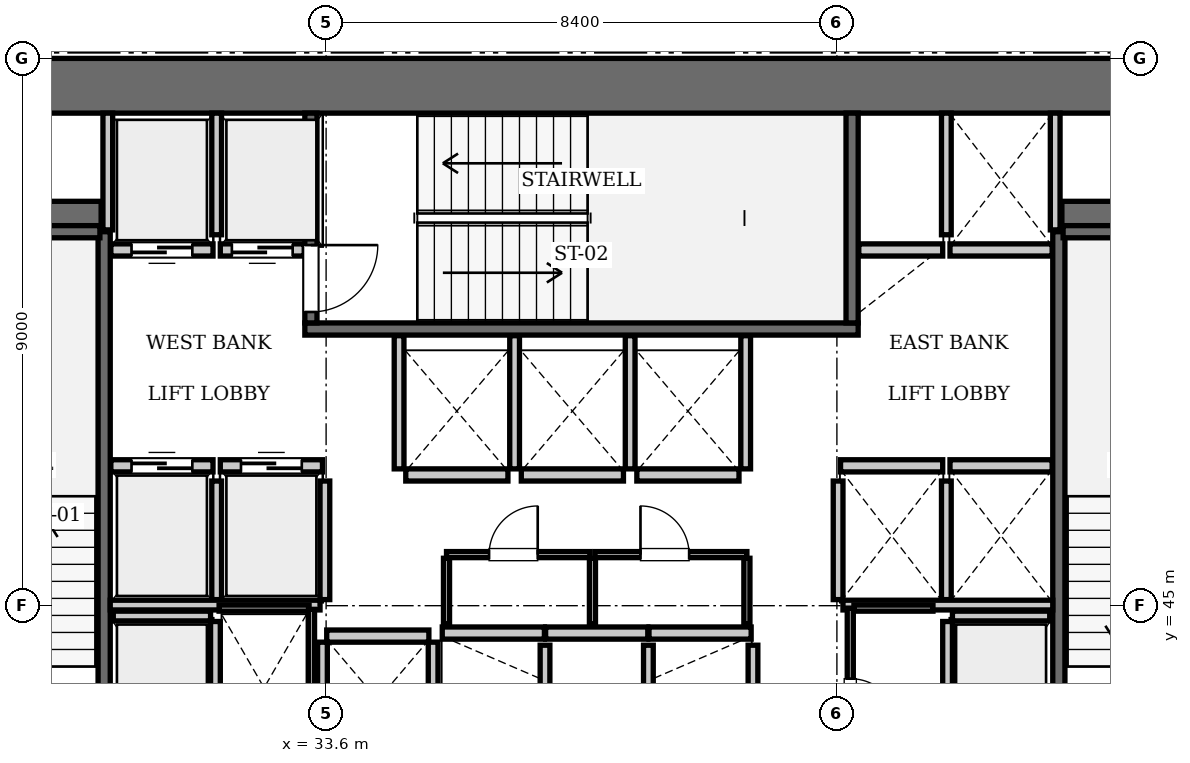
"""IFC4 building model, lengths in metres.
Left out: names, types, materials, properties, quantities, classifications, styles, units other than length and angle.
Written with IfcOpenShell. Run it as: python <this file> out.ifc"""

import sys

from ifc_helpers import new_model, si_unit, direction, frame, frame_2d, origin, place, context, subcontext, project, spatial, rectangle, extrude, element, fill, save


model = new_model("IFC4")
c1 = context("Model", 3, precision=1e-05, world=origin(), true_north=direction((0.0, 1.0)))
c2 = subcontext(c1, "Body", "Model", "MODEL_VIEW")
j1 = project(units=[si_unit("LENGTHUNIT", "METRE"), si_unit("PLANEANGLEUNIT", "RADIAN")], contexts=[c1])
p1 = place(None, origin())
s1 = spatial("IfcSite", under=j1, at=p1, CompositionType="ELEMENT")
p2 = place(p1, origin())
s2 = spatial("IfcBuilding", under=s1, at=p2, CompositionType="ELEMENT")
p3 = place(p2, frame((0.0, 0.0, 96.25)))
s3 = spatial("IfcBuildingStorey", under=s2, at=p3, CompositionType="ELEMENT", Elevation=96.25)
p4 = place(p3, frame((25.2, 53.55, 0.0), z_axis=(0.0, 0.0, 1.0), x_axis=(1.0, 0.0, 0.0)))
e1 = element("IfcWall", 1, at=p4, inside=s3, PredefinedType="SHEAR", context=c2, shape_type="SweptSolid", body=[
    extrude(rectangle(XDim=25.2, YDim=0.9, at=frame_2d((12.6, 0.0))), origin(), (0.0, 0.0, 1.0), 3.85),
])
p5 = place(p3, frame((26.1, 51.4, 0.0), z_axis=(0.0, 0.0, 1.0), x_axis=(1.0, 0.0, 0.0)))
e2 = element("IfcWall", 2, at=p5, inside=s3, PredefinedType="SHEAR", context=c2, shape_type="SweptSolid", body=[
    extrude(rectangle(XDim=3.8, YDim=0.5, at=frame_2d((1.9, 0.0))), origin(), (0.0, 0.0, 1.0), 3.85),
])
p6 = place(p3, frame((45.7, 51.4, 0.0), z_axis=(0.0, 0.0, 1.0), x_axis=(1.0, 0.0, 0.0)))
e3 = element("IfcWall", 3, at=p6, inside=s3, PredefinedType="SHEAR", context=c2, shape_type="SweptSolid", body=[
    extrude(rectangle(XDim=3.8, YDim=0.5, at=frame_2d((1.9, 0.0))), origin(), (0.0, 0.0, 1.0), 3.85),
])
p7 = place(p3, frame((29.95, 42.3, 0.0), z_axis=(0.0, 0.0, 1.0), x_axis=(0.0, 1.0, 0.0)))
e4 = element("IfcWall", 4, at=p7, inside=s3, PredefinedType="SOLIDWALL", context=c2, shape_type="SweptSolid", body=[
    extrude(rectangle(XDim=8.85, YDim=0.2, at=frame_2d((4.425, 0.0))), origin(), (0.0, 0.0, 1.0), 3.61),
])
p8 = place(p3, frame((26.38, 51.15, 0.0), z_axis=(0.0, 0.0, 1.0), x_axis=(1.0, 0.0, 0.0)))
e5 = element("IfcWall", 5, at=p8, inside=s3, PredefinedType="SOLIDWALL", context=c2, shape_type="SweptSolid", body=[
    extrude(rectangle(XDim=3.5, YDim=0.2, at=frame_2d((1.75, 0.0))), origin(), (0.0, 0.0, 1.0), 3.61),
])
p9 = place(p3, frame((33.25, 49.55, 0.0), z_axis=(0.0, 0.0, 1.0), x_axis=(1.0, 0.0, 0.0)))
e6 = element("IfcWall", 6, at=p9, inside=s3, PredefinedType="SOLIDWALL", context=c2, shape_type="SweptSolid", body=[
    extrude(rectangle(XDim=9.1, YDim=0.2, at=frame_2d((4.55, 0.0))), origin(), (0.0, 0.0, 1.0), 3.61),
])
p10 = place(p3, frame((42.25, 49.65, 0.0), z_axis=(0.0, 0.0, 1.0), x_axis=(0.0, 1.0, 0.0)))
e7 = element("IfcWall", 7, at=p10, inside=s3, PredefinedType="SOLIDWALL", context=c2, shape_type="SweptSolid", body=[
    extrude(rectangle(XDim=3.45, YDim=0.2, at=frame_2d((1.725, 0.0))), origin(), (0.0, 0.0, 1.0), 3.61),
])
p11 = place(p3, frame((33.35, 49.65, 0.0), z_axis=(0.0, 0.0, 1.0), x_axis=(0.0, 1.0, 0.0)))
e8 = element("IfcWall", 8, at=p11, inside=s3, PredefinedType="SOLIDWALL", context=c2, shape_type="SweptSolid", body=[
    extrude(rectangle(XDim=3.45, YDim=0.2, at=frame_2d((1.725, 0.0))), origin(), (0.0, 0.0, 1.0), 3.61),
])
p12 = place(p11, frame((0.18, 0.0, 0.0)))
e9 = element("IfcOpeningElement", 9, at=p12, cuts=e8, PredefinedType="OPENING", context=c2, shape_type="SweptSolid", body=[
    extrude(rectangle(XDim=1.1, YDim=2.15, at=frame_2d((0.55, 1.075))), frame((0.0, 0.11, 0.0), z_axis=(0.0, -1.0, 0.0), x_axis=(1.0, 0.0, 0.0)), (0.0, 0.0, 1.0), 0.22),
])
p13 = place(p3, frame((45.65, 42.3, 0.0), z_axis=(0.0, 0.0, 1.0), x_axis=(0.0, 1.0, 0.0)))
e10 = element("IfcWall", 10, at=p13, inside=s3, PredefinedType="SOLIDWALL", context=c2, shape_type="SweptSolid", body=[
    extrude(rectangle(XDim=8.85, YDim=0.2, at=frame_2d((4.425, 0.0))), origin(), (0.0, 0.0, 1.0), 3.61),
])
p14 = place(p3, frame((45.72, 51.15, 0.0), z_axis=(0.0, 0.0, 1.0), x_axis=(1.0, 0.0, 0.0)))
e11 = element("IfcWall", 11, at=p14, inside=s3, PredefinedType="SOLIDWALL", context=c2, shape_type="SweptSolid", body=[
    extrude(rectangle(XDim=3.5, YDim=0.2, at=frame_2d((1.75, 0.0))), origin(), (0.0, 0.0, 1.0), 3.61),
])
p15 = place(p3, frame((30.06, 47.3, 0.0), z_axis=(0.0, 0.0, 1.0), x_axis=(1.0, 0.0, 0.0)))
e12 = element("IfcWall", 12, at=p15, inside=s3, PredefinedType="SOLIDWALL", context=c2, shape_type="SweptSolid", body=[
    extrude(rectangle(XDim=1.68, YDim=0.2, at=frame_2d((0.84, 0.0))), origin(), (0.0, 0.0, 1.0), 3.61),
])
p16 = place(p15, frame((0.34, 0.0, 0.0)))
e13 = element("IfcOpeningElement", 13, at=p16, cuts=e12, PredefinedType="OPENING", context=c2, shape_type="SweptSolid", body=[
    extrude(rectangle(XDim=1.0, YDim=2.15, at=frame_2d((0.5, 1.075))), frame((0.0, 0.11, 0.0), z_axis=(0.0, -1.0, 0.0), x_axis=(1.0, 0.0, 0.0)), (0.0, 0.0, 1.0), 0.22),
])
p17 = place(p3, frame((31.86, 47.3, 0.0), z_axis=(0.0, 0.0, 1.0), x_axis=(1.0, 0.0, 0.0)))
e14 = element("IfcWall", 14, at=p17, inside=s3, PredefinedType="SOLIDWALL", context=c2, shape_type="SweptSolid", body=[
    extrude(rectangle(XDim=1.68, YDim=0.2, at=frame_2d((0.84, 0.0))), origin(), (0.0, 0.0, 1.0), 3.61),
])
p18 = place(p17, frame((0.34, 0.0, 0.0)))
e15 = element("IfcOpeningElement", 15, at=p18, cuts=e14, PredefinedType="OPENING", context=c2, shape_type="SweptSolid", body=[
    extrude(rectangle(XDim=1.0, YDim=2.15, at=frame_2d((0.5, 1.075))), frame((0.0, 0.11, 0.0), z_axis=(0.0, -1.0, 0.0), x_axis=(1.0, 0.0, 0.0)), (0.0, 0.0, 1.0), 0.22),
])
p19 = place(p3, frame((30.06, 50.85, 0.0), z_axis=(0.0, 0.0, 1.0), x_axis=(1.0, 0.0, 0.0)))
e16 = element("IfcWall", 16, at=p19, inside=s3, PredefinedType="SOLIDWALL", context=c2, shape_type="SweptSolid", body=[
    extrude(rectangle(XDim=1.68, YDim=0.2, at=frame_2d((0.84, 0.0))), origin(), (0.0, 0.0, 1.0), 3.61),
])
p20 = place(p19, frame((0.34, 0.0, 0.0)))
e17 = element("IfcOpeningElement", 17, at=p20, cuts=e16, PredefinedType="OPENING", context=c2, shape_type="SweptSolid", body=[
    extrude(rectangle(XDim=1.0, YDim=2.15, at=frame_2d((0.5, 1.075))), frame((0.0, 0.11, 0.0), z_axis=(0.0, -1.0, 0.0), x_axis=(1.0, 0.0, 0.0)), (0.0, 0.0, 1.0), 0.22),
])
p21 = place(p3, frame((31.86, 50.85, 0.0), z_axis=(0.0, 0.0, 1.0), x_axis=(1.0, 0.0, 0.0)))
e18 = element("IfcWall", 18, at=p21, inside=s3, PredefinedType="SOLIDWALL", context=c2, shape_type="SweptSolid", body=[
    extrude(rectangle(XDim=1.38, YDim=0.2, at=frame_2d((0.69, 0.0))), origin(), (0.0, 0.0, 1.0), 3.61),
])
p22 = place(p21, frame((0.19, 0.0, 0.0)))
e19 = element("IfcOpeningElement", 19, at=p22, cuts=e18, PredefinedType="OPENING", context=c2, shape_type="SweptSolid", body=[
    extrude(rectangle(XDim=1.0, YDim=2.15, at=frame_2d((0.5, 1.075))), frame((0.0, 0.11, 0.0), z_axis=(0.0, -1.0, 0.0), x_axis=(1.0, 0.0, 0.0)), (0.0, 0.0, 1.0), 0.22),
])
for number, where, z_axis, x_axis in (
    (20, (42.06, 47.3, 0.0), (0.0, 0.0, 1.0), (1.0, 0.0, 0.0)),
    (21, (43.86, 47.3, 0.0), (0.0, 0.0, 1.0), (1.0, 0.0, 0.0)),
):
    element("IfcWall", number, at=place(p3, frame(where, z_axis=z_axis, x_axis=x_axis)), inside=s3, PredefinedType="SOLIDWALL", context=c2, shape_type="SweptSolid", body=[
        extrude(rectangle(XDim=1.68, YDim=0.2, at=frame_2d((0.84, 0.0))), origin(), (0.0, 0.0, 1.0), 3.61),
    ])
p23 = place(p3, frame((42.36, 50.85, 0.0), z_axis=(0.0, 0.0, 1.0), x_axis=(1.0, 0.0, 0.0)))
e22 = element("IfcWall", 22, at=p23, inside=s3, PredefinedType="SOLIDWALL", context=c2, shape_type="SweptSolid", body=[
    extrude(rectangle(XDim=1.38, YDim=0.2, at=frame_2d((0.69, 0.0))), origin(), (0.0, 0.0, 1.0), 3.61),
])
for number, where, z_axis, x_axis in (
    (23, (43.86, 50.85, 0.0), (0.0, 0.0, 1.0), (1.0, 0.0, 0.0)),
    (24, (35.51, 44.55, 0.0), (0.0, 0.0, 1.0), (1.0, 0.0, 0.0)),
    (25, (37.21, 44.55, 0.0), (0.0, 0.0, 1.0), (1.0, 0.0, 0.0)),
):
    element("IfcWall", number, at=place(p3, frame(where, z_axis=z_axis, x_axis=x_axis)), inside=s3, PredefinedType="SOLIDWALL", context=c2, shape_type="SweptSolid", body=[
        extrude(rectangle(XDim=1.68, YDim=0.2, at=frame_2d((0.84, 0.0))), origin(), (0.0, 0.0, 1.0), 3.61),
    ])
for number, where, z_axis, x_axis in (
    (26, (38.91, 44.55, 0.0), (0.0, 0.0, 1.0), (1.0, 0.0, 0.0)),
    (27, (34.91, 47.15, 0.0), (0.0, 0.0, 1.0), (1.0, 0.0, 0.0)),
):
    element("IfcWall", number, at=place(p3, frame(where, z_axis=z_axis, x_axis=x_axis)), inside=s3, PredefinedType="SOLIDWALL", context=c2, shape_type="SweptSolid", body=[
        extrude(rectangle(XDim=1.68, YDim=0.2, at=frame_2d((0.84, 0.0))), origin(), (0.0, 0.0, 1.0), 3.61),
    ])
for number, where, z_axis, x_axis in (
    (28, (36.81, 47.15, 0.0), (0.0, 0.0, 1.0), (1.0, 0.0, 0.0)),
    (29, (38.71, 47.15, 0.0), (0.0, 0.0, 1.0), (1.0, 0.0, 0.0)),
    (30, (33.61, 44.5, 0.0), (0.0, 0.0, 1.0), (1.0, 0.0, 0.0)),
):
    element("IfcWall", number, at=place(p3, frame(where, z_axis=z_axis, x_axis=x_axis)), inside=s3, PredefinedType="SOLIDWALL", context=c2, shape_type="SweptSolid", body=[
        extrude(rectangle(XDim=1.68, YDim=0.2, at=frame_2d((0.84, 0.0))), origin(), (0.0, 0.0, 1.0), 3.61),
    ])
p24 = place(p3, frame((30.1, 44.83, 0.0), z_axis=(0.0, 0.0, 1.0), x_axis=(1.0, 0.0, 0.0)))
e31 = element("IfcWall", 31, at=p24, inside=s3, PredefinedType="SOLIDWALL", context=c2, shape_type="SweptSolid", body=[
    extrude(rectangle(XDim=1.6, YDim=0.16, at=frame_2d((0.8, 0.0))), origin(), (0.0, 0.0, 1.0), 3.61),
])
p25 = place(p3, frame((31.78, 42.3, 0.0), z_axis=(0.0, 0.0, 1.0), x_axis=(0.0, 1.0, 0.0)))
e32 = element("IfcWall", 32, at=p25, inside=s3, PredefinedType="SOLIDWALL", context=c2, shape_type="SweptSolid", body=[
    extrude(rectangle(XDim=2.44, YDim=0.16, at=frame_2d((1.22, 0.0))), origin(), (0.0, 0.0, 1.0), 3.61),
])
p26 = place(p3, frame((43.9, 44.83, 0.0), z_axis=(0.0, 0.0, 1.0), x_axis=(1.0, 0.0, 0.0)))
e33 = element("IfcWall", 33, at=p26, inside=s3, PredefinedType="SOLIDWALL", context=c2, shape_type="SweptSolid", body=[
    extrude(rectangle(XDim=1.6, YDim=0.16, at=frame_2d((0.8, 0.0))), origin(), (0.0, 0.0, 1.0), 3.61),
])
p27 = place(p3, frame((43.82, 42.3, 0.0), z_axis=(0.0, 0.0, 1.0), x_axis=(0.0, 1.0, 0.0)))
e34 = element("IfcWall", 34, at=p27, inside=s3, PredefinedType="SOLIDWALL", context=c2, shape_type="SweptSolid", body=[
    extrude(rectangle(XDim=2.44, YDim=0.16, at=frame_2d((1.22, 0.0))), origin(), (0.0, 0.0, 1.0), 3.61),
])
for number, where, z_axis, x_axis in (
    (35, (31.8, 45.1, 0.0), (0.0, 0.0, 1.0), (0.0, 1.0, 0.0)),
    (36, (33.58, 45.1, 0.0), (0.0, 0.0, 1.0), (0.0, 1.0, 0.0)),
):
    element("IfcWall", number, at=place(p3, frame(where, z_axis=z_axis, x_axis=x_axis)), inside=s3, PredefinedType="SOLIDWALL", context=c2, shape_type="SweptSolid", body=[
        extrude(rectangle(XDim=1.95, YDim=0.16, at=frame_2d((0.975, 0.0))), origin(), (0.0, 0.0, 1.0), 3.61),
    ])
p28 = place(p3, frame((30.05, 45.01, 0.0), z_axis=(0.0, 0.0, 1.0), x_axis=(1.0, 0.0, 0.0)))
e37 = element("IfcWall", 37, at=p28, inside=s3, PredefinedType="SOLIDWALL", context=c2, shape_type="SweptSolid", body=[
    extrude(rectangle(XDim=3.45, YDim=0.16, at=frame_2d((1.725, 0.0))), origin(), (0.0, 0.0, 1.0), 3.61),
])
p29 = place(p3, frame((30.01, 51.18, 0.0), z_axis=(0.0, 0.0, 1.0), x_axis=(0.0, 1.0, 0.0)))
e38 = element("IfcWall", 38, at=p29, inside=s3, PredefinedType="SOLIDWALL", context=c2, shape_type="SweptSolid", body=[
    extrude(rectangle(XDim=1.92, YDim=0.16, at=frame_2d((0.96, 0.0))), origin(), (0.0, 0.0, 1.0), 3.61),
])
p30 = place(p3, frame((31.8, 51.1, 0.0), z_axis=(0.0, 0.0, 1.0), x_axis=(0.0, 1.0, 0.0)))
e39 = element("IfcWall", 39, at=p30, inside=s3, PredefinedType="SOLIDWALL", context=c2, shape_type="SweptSolid", body=[
    extrude(rectangle(XDim=2.0, YDim=0.16, at=frame_2d((1.0, 0.0))), origin(), (0.0, 0.0, 1.0), 3.61),
])
for number, where, z_axis, x_axis in (
    (40, (42.02, 45.1, 0.0), (0.0, 0.0, 1.0), (0.0, 1.0, 0.0)),
    (41, (43.8, 45.1, 0.0), (0.0, 0.0, 1.0), (0.0, 1.0, 0.0)),
):
    element("IfcWall", number, at=place(p3, frame(where, z_axis=z_axis, x_axis=x_axis)), inside=s3, PredefinedType="SOLIDWALL", context=c2, shape_type="SweptSolid", body=[
        extrude(rectangle(XDim=1.95, YDim=0.16, at=frame_2d((0.975, 0.0))), origin(), (0.0, 0.0, 1.0), 3.61),
    ])
p31 = place(p3, frame((42.1, 45.01, 0.0), z_axis=(0.0, 0.0, 1.0), x_axis=(1.0, 0.0, 0.0)))
e42 = element("IfcWall", 42, at=p31, inside=s3, PredefinedType="SOLIDWALL", context=c2, shape_type="SweptSolid", body=[
    extrude(rectangle(XDim=3.45, YDim=0.16, at=frame_2d((1.725, 0.0))), origin(), (0.0, 0.0, 1.0), 3.61),
])
p32 = place(p3, frame((45.59, 51.18, 0.0), z_axis=(0.0, 0.0, 1.0), x_axis=(0.0, 1.0, 0.0)))
e43 = element("IfcWall", 43, at=p32, inside=s3, PredefinedType="SOLIDWALL", context=c2, shape_type="SweptSolid", body=[
    extrude(rectangle(XDim=1.92, YDim=0.16, at=frame_2d((0.96, 0.0))), origin(), (0.0, 0.0, 1.0), 3.61),
])
p33 = place(p3, frame((43.8, 51.1, 0.0), z_axis=(0.0, 0.0, 1.0), x_axis=(0.0, 1.0, 0.0)))
e44 = element("IfcWall", 44, at=p33, inside=s3, PredefinedType="SOLIDWALL", context=c2, shape_type="SweptSolid", body=[
    extrude(rectangle(XDim=2.0, YDim=0.16, at=frame_2d((1.0, 0.0))), origin(), (0.0, 0.0, 1.0), 3.61),
])
for number, where, z_axis, x_axis in (
    (45, (37.2, 42.3, 0.0), (0.0, 0.0, 1.0), (0.0, 1.0, 0.0)),
    (46, (38.9, 42.3, 0.0), (0.0, 0.0, 1.0), (0.0, 1.0, 0.0)),
    (47, (40.62, 42.3, 0.0), (0.0, 0.0, 1.0), (0.0, 1.0, 0.0)),
):
    element("IfcWall", number, at=place(p3, frame(where, z_axis=z_axis, x_axis=x_axis)), inside=s3, PredefinedType="SOLIDWALL", context=c2, shape_type="SweptSolid", body=[
        extrude(rectangle(XDim=2.05, YDim=0.16, at=frame_2d((1.025, 0.0))), origin(), (0.0, 0.0, 1.0), 3.61),
    ])
for number, where, z_axis, x_axis in (
    (48, (34.8, 47.25, 0.0), (0.0, 0.0, 1.0), (0.0, 1.0, 0.0)),
    (49, (36.7, 47.25, 0.0), (0.0, 0.0, 1.0), (0.0, 1.0, 0.0)),
    (50, (38.6, 47.25, 0.0), (0.0, 0.0, 1.0), (0.0, 1.0, 0.0)),
    (51, (40.5, 47.25, 0.0), (0.0, 0.0, 1.0), (0.0, 1.0, 0.0)),
):
    element("IfcWall", number, at=place(p3, frame(where, z_axis=z_axis, x_axis=x_axis)), inside=s3, PredefinedType="SOLIDWALL", context=c2, shape_type="SweptSolid", body=[
        extrude(rectangle(XDim=2.19, YDim=0.16, at=frame_2d((1.095, 0.0))), origin(), (0.0, 0.0, 1.0), 3.61),
    ])
for number, where, z_axis, x_axis in (
    (52, (33.54, 42.3, 0.0), (0.0, 0.0, 1.0), (0.0, 1.0, 0.0)),
    (53, (35.36, 42.3, 0.0), (0.0, 0.0, 1.0), (0.0, 1.0, 0.0)),
):
    element("IfcWall", number, at=place(p3, frame(where, z_axis=z_axis, x_axis=x_axis)), inside=s3, PredefinedType="SOLIDWALL", context=c2, shape_type="SweptSolid", body=[
        extrude(rectangle(XDim=2.1, YDim=0.16, at=frame_2d((1.05, 0.0))), origin(), (0.0, 0.0, 1.0), 3.61),
    ])
p34 = place(p3, frame((31.84, 44.96, 0.0), z_axis=(0.0, 0.0, 1.0), x_axis=(1.0, 0.0, 0.0)))
e54 = element("IfcWall", 54, at=p34, inside=s3, PredefinedType="PARTITIONING", context=c2, shape_type="SweptSolid", body=[
    extrude(rectangle(XDim=1.48, YDim=0.1, at=frame_2d((0.74, 0.0))), origin(), (0.0, 0.0, 1.0), 3.61),
])
p35 = place(p3, frame((33.36, 42.36, 0.0), z_axis=(0.0, 0.0, 1.0), x_axis=(0.0, 1.0, 0.0)))
e55 = element("IfcWall", 55, at=p35, inside=s3, PredefinedType="PARTITIONING", context=c2, shape_type="SweptSolid", body=[
    extrude(rectangle(XDim=2.58, YDim=0.1, at=frame_2d((1.29, 0.0))), origin(), (0.0, 0.0, 1.0), 3.61),
])
p36 = place(p3, frame((35.58, 45.84, 0.0), z_axis=(0.0, 0.0, 1.0), x_axis=(1.0, 0.0, 0.0)))
e56 = element("IfcWall", 56, at=p36, inside=s3, PredefinedType="PARTITIONING", context=c2, shape_type="SweptSolid", body=[
    extrude(rectangle(XDim=2.36, YDim=0.1, at=frame_2d((1.18, 0.0))), origin(), (0.0, 0.0, 1.0), 3.61),
])
p37 = place(p36, frame((0.7, 0.0, 0.0)))
e57 = element("IfcOpeningElement", 57, at=p37, cuts=e56, PredefinedType="OPENING", context=c2, shape_type="SweptSolid", body=[
    extrude(rectangle(XDim=0.8, YDim=2.05, at=frame_2d((0.4, 1.025))), frame((0.0, 0.06, 0.0), z_axis=(0.0, -1.0, 0.0), x_axis=(1.0, 0.0, 0.0)), (0.0, 0.0, 1.0), 0.12),
])
p38 = place(p3, frame((38.02, 45.84, 0.0), z_axis=(0.0, 0.0, 1.0), x_axis=(1.0, 0.0, 0.0)))
e58 = element("IfcWall", 58, at=p38, inside=s3, PredefinedType="PARTITIONING", context=c2, shape_type="SweptSolid", body=[
    extrude(rectangle(XDim=2.5, YDim=0.1, at=frame_2d((1.25, 0.0))), origin(), (0.0, 0.0, 1.0), 3.61),
])
p39 = place(p38, frame((0.75, 0.0, 0.0)))
e59 = element("IfcOpeningElement", 59, at=p39, cuts=e58, PredefinedType="OPENING", context=c2, shape_type="SweptSolid", body=[
    extrude(rectangle(XDim=0.8, YDim=2.05, at=frame_2d((0.4, 1.025))), frame((0.0, 0.06, 0.0), z_axis=(0.0, -1.0, 0.0), x_axis=(1.0, 0.0, 0.0)), (0.0, 0.0, 1.0), 0.12),
])
for number, where, z_axis, x_axis in (
    (60, (35.58, 44.7, 0.0), (0.0, 0.0, 1.0), (0.0, 1.0, 0.0)),
    (61, (37.98, 44.7, 0.0), (0.0, 0.0, 1.0), (0.0, 1.0, 0.0)),
    (62, (40.52, 44.7, 0.0), (0.0, 0.0, 1.0), (0.0, 1.0, 0.0)),
):
    element("IfcWall", number, at=place(p3, frame(where, z_axis=z_axis, x_axis=x_axis)), inside=s3, PredefinedType="PARTITIONING", context=c2, shape_type="SweptSolid", body=[
        extrude(rectangle(XDim=1.08, YDim=0.1, at=frame_2d((0.54, 0.0))), origin(), (0.0, 0.0, 1.0), 3.61),
    ])
p40 = place(p3, frame((42.22, 42.35, 0.0), z_axis=(0.0, 0.0, 1.0), x_axis=(0.0, 1.0, 0.0)))
e63 = element("IfcWall", 63, at=p40, inside=s3, PredefinedType="PARTITIONING", context=c2, shape_type="SweptSolid", body=[
    extrude(rectangle(XDim=2.61, YDim=0.1, at=frame_2d((1.305, 0.0))), origin(), (0.0, 0.0, 1.0), 3.61),
])
p41 = place(p40, frame((0.65, 0.0, 0.0)))
e64 = element("IfcOpeningElement", 64, at=p41, cuts=e63, PredefinedType="OPENING", context=c2, shape_type="SweptSolid", body=[
    extrude(rectangle(XDim=0.8, YDim=2.05, at=frame_2d((0.4, 1.025))), frame((0.0, 0.06, 0.0), z_axis=(0.0, -1.0, 0.0), x_axis=(1.0, 0.0, 0.0)), (0.0, 0.0, 1.0), 0.12),
])
p42 = place(p3, frame((42.28, 44.96, 0.0), z_axis=(0.0, 0.0, 1.0), x_axis=(1.0, 0.0, 0.0)))
e65 = element("IfcWall", 65, at=p42, inside=s3, PredefinedType="PARTITIONING", context=c2, shape_type="SweptSolid", body=[
    extrude(rectangle(XDim=1.3, YDim=0.1, at=frame_2d((0.65, 0.0))), origin(), (0.0, 0.0, 1.0), 3.61),
])
p43 = place(p12, frame((1.1, 0.0, 0.0), z_axis=(0.0, 0.0, 1.0), x_axis=(-1.0, 0.0, 0.0)))
e66 = element("IfcDoor", 66, at=p43, inside=s3, OperationType="SINGLE_SWING_LEFT", PredefinedType="DOOR", context=c2, shape_type="SweptSolid", body=[
    extrude(rectangle(XDim=1.1, YDim=2.15, at=frame_2d((0.55, 1.075))), frame((0.0, 0.025, 0.0), z_axis=(0.0, -1.0, 0.0), x_axis=(1.0, 0.0, 0.0)), (0.0, 0.0, 1.0), 0.05),
])
fill(e9, e66)
p44 = place(p16, origin())
e67 = element("IfcDoor", 67, at=p44, inside=s3, OperationType="SLIDING_TO_LEFT", PredefinedType="DOOR", context=c2, shape_type="SweptSolid", body=[
    extrude(rectangle(XDim=1.0, YDim=2.15, at=frame_2d((0.5, 1.075))), frame((0.0, 0.025, 0.0), z_axis=(0.0, -1.0, 0.0), x_axis=(1.0, 0.0, 0.0)), (0.0, 0.0, 1.0), 0.05),
])
fill(e13, e67)
p45 = place(p18, origin())
e68 = element("IfcDoor", 68, at=p45, inside=s3, OperationType="SLIDING_TO_LEFT", PredefinedType="DOOR", context=c2, shape_type="SweptSolid", body=[
    extrude(rectangle(XDim=1.0, YDim=2.15, at=frame_2d((0.5, 1.075))), frame((0.0, 0.025, 0.0), z_axis=(0.0, -1.0, 0.0), x_axis=(1.0, 0.0, 0.0)), (0.0, 0.0, 1.0), 0.05),
])
fill(e15, e68)
p46 = place(p20, frame((1.0, 0.0, 0.0), z_axis=(0.0, 0.0, 1.0), x_axis=(-1.0, 0.0, 0.0)))
e69 = element("IfcDoor", 69, at=p46, inside=s3, OperationType="SLIDING_TO_LEFT", PredefinedType="DOOR", context=c2, shape_type="SweptSolid", body=[
    extrude(rectangle(XDim=1.0, YDim=2.15, at=frame_2d((0.5, 1.075))), frame((0.0, 0.025, 0.0), z_axis=(0.0, -1.0, 0.0), x_axis=(1.0, 0.0, 0.0)), (0.0, 0.0, 1.0), 0.05),
])
fill(e17, e69)
p47 = place(p22, frame((1.0, 0.0, 0.0), z_axis=(0.0, 0.0, 1.0), x_axis=(-1.0, 0.0, 0.0)))
e70 = element("IfcDoor", 70, at=p47, inside=s3, OperationType="SLIDING_TO_LEFT", PredefinedType="DOOR", context=c2, shape_type="SweptSolid", body=[
    extrude(rectangle(XDim=1.0, YDim=2.15, at=frame_2d((0.5, 1.075))), frame((0.0, 0.025, 0.0), z_axis=(0.0, -1.0, 0.0), x_axis=(1.0, 0.0, 0.0)), (0.0, 0.0, 1.0), 0.05),
])
fill(e19, e70)
p48 = place(p37, origin())
e71 = element("IfcDoor", 71, at=p48, inside=s3, OperationType="SINGLE_SWING_RIGHT", PredefinedType="DOOR", context=c2, shape_type="SweptSolid", body=[
    extrude(rectangle(XDim=0.8, YDim=2.05, at=frame_2d((0.4, 1.025))), frame((0.0, 0.025, 0.0), z_axis=(0.0, -1.0, 0.0), x_axis=(1.0, 0.0, 0.0)), (0.0, 0.0, 1.0), 0.05),
])
fill(e57, e71)
p49 = place(p39, origin())
e72 = element("IfcDoor", 72, at=p49, inside=s3, OperationType="SINGLE_SWING_LEFT", PredefinedType="DOOR", context=c2, shape_type="SweptSolid", body=[
    extrude(rectangle(XDim=0.8, YDim=2.05, at=frame_2d((0.4, 1.025))), frame((0.0, 0.025, 0.0), z_axis=(0.0, -1.0, 0.0), x_axis=(1.0, 0.0, 0.0)), (0.0, 0.0, 1.0), 0.05),
])
fill(e59, e72)
p50 = place(p41, frame((0.8, 0.0, 0.0), z_axis=(0.0, 0.0, 1.0), x_axis=(-1.0, 0.0, 0.0)))
e73 = element("IfcDoor", 73, at=p50, inside=s3, OperationType="SINGLE_SWING_RIGHT", PredefinedType="DOOR", context=c2, shape_type="SweptSolid", body=[
    extrude(rectangle(XDim=0.8, YDim=2.05, at=frame_2d((0.4, 1.025))), frame((0.0, 0.025, 0.0), z_axis=(0.0, -1.0, 0.0), x_axis=(1.0, 0.0, 0.0)), (0.0, 0.0, 1.0), 0.05),
])
fill(e64, e73)
save(model, sys.argv[1])
